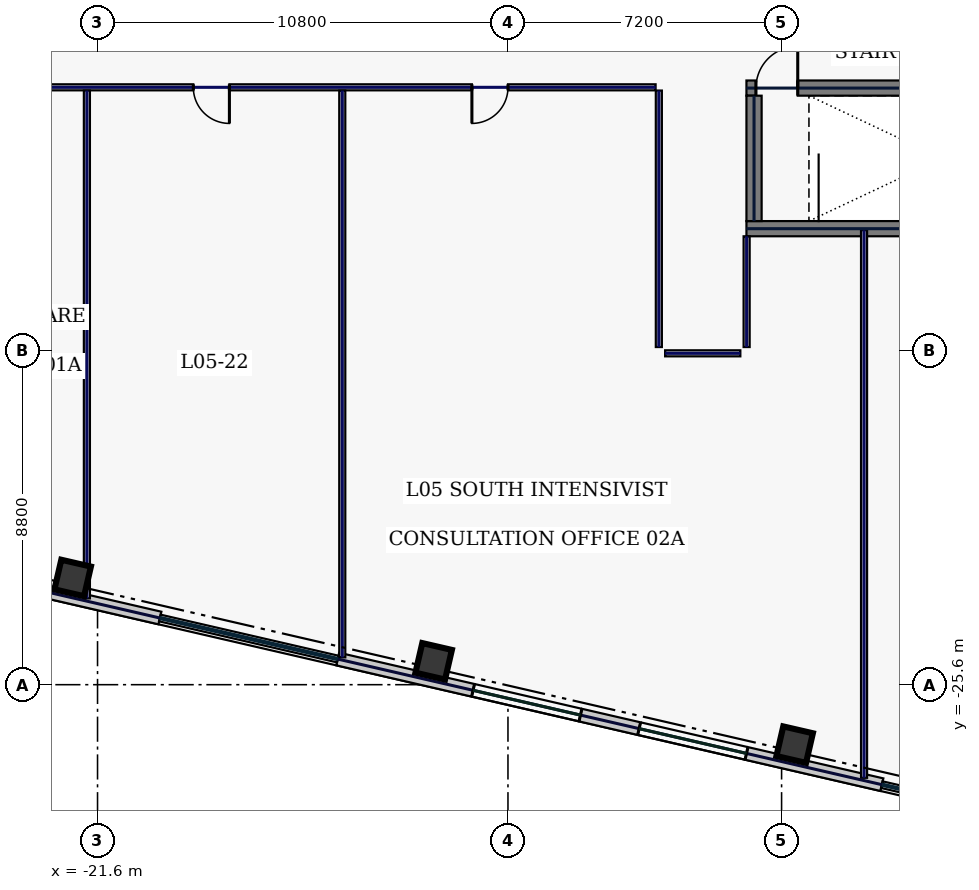
"""IFC4 building model, lengths in metres.
Left out: names, types, materials, properties, quantities, classifications, styles, units other than length and angle.
Written with IfcOpenShell. Run it as: python <this file> out.ifc"""

import sys

from ifc_helpers import new_model, si_unit, direction, frame, frame_2d, origin, origin_2d, place, context, subcontext, project, spatial, rectangle, hollow_rectangle, extrude, element, fill, save


model = new_model("IFC4")
c1 = context("Model", 3, precision=1e-05, world=origin(), true_north=direction((0.0, 1.0)))
c2 = subcontext(c1, "Body", "Model", "MODEL_VIEW")
j1 = project(units=[si_unit("LENGTHUNIT", "METRE"), si_unit("PLANEANGLEUNIT", "RADIAN")], contexts=[c1])
p1 = place(None, origin())
s1 = spatial("IfcSite", under=j1, at=p1, CompositionType="ELEMENT")
p2 = place(p1, origin())
s2 = spatial("IfcBuilding", under=s1, at=p2, CompositionType="ELEMENT")
p3 = place(p2, frame((0.0, 0.0, 28.4)))
s3 = spatial("IfcBuildingStorey", under=s2, at=p3, CompositionType="ELEMENT", Elevation=28.4)
p4 = place(p3, frame((-4.525, -13.6, 0.0), z_axis=(0.0, 0.0, 1.0), x_axis=(1.0, 0.0, 0.0)))
e1 = element("IfcWall", 1, at=p4, inside=s3, PredefinedType="SHEAR", context=c2, shape_type="SweptSolid", body=[
    extrude(rectangle(XDim=9.05, YDim=0.4, at=frame_2d((4.525, 0.0))), origin(), (0.0, 0.0, 1.0), 4.68),
])
p5 = place(p3, frame((-4.525, -9.9, 0.0), z_axis=(0.0, 0.0, 1.0), x_axis=(1.0, 0.0, 0.0)))
e2 = element("IfcWall", 2, at=p5, inside=s3, PredefinedType="SHEAR", context=c2, shape_type="SweptSolid", body=[
    extrude(rectangle(XDim=9.05, YDim=0.4, at=frame_2d((4.525, 0.0))), origin(), (0.0, 0.0, 1.0), 4.68),
])
p6 = place(p5, frame((0.25, 0.0, 0.0)))
e3 = element("IfcOpeningElement", 3, at=p6, cuts=e2, PredefinedType="OPENING", context=c2, shape_type="SweptSolid", body=[
    extrude(rectangle(XDim=1.1, YDim=2.2, at=frame_2d((0.55, 1.1))), frame((0.0, 0.21, 0.0), z_axis=(0.0, -1.0, 0.0), x_axis=(1.0, 0.0, 0.0)), (0.0, 0.0, 1.0), 0.42),
])
p7 = place(p3, frame((-4.325, -13.4, 0.0), z_axis=(0.0, 0.0, 1.0), x_axis=(0.0, 1.0, 0.0)))
e4 = element("IfcWall", 4, at=p7, inside=s3, PredefinedType="SHEAR", context=c2, shape_type="SweptSolid", body=[
    extrude(rectangle(XDim=3.3, YDim=0.4, at=frame_2d((1.65, 0.0))), origin(), (0.0, 0.0, 1.0), 4.68),
])
for number, where, z_axis, x_axis in (
    (5, (-22.254, -22.792, 0.0), (0.0, 0.0, 1.0), (0.974, -0.225, 0.0)),
    (6, (-12.755, -24.985, 0.0), (0.0, 0.0, 1.0), (0.974, -0.225, 0.0)),
    (7, (-3.256, -27.178, 0.0), (0.0, 0.0, 1.0), (0.974, -0.225, 0.0)),
):
    element("IfcColumn", number, at=place(p3, frame(where, z_axis=z_axis, x_axis=x_axis)), inside=s3, PredefinedType="COLUMN", context=c2, shape_type="SweptSolid", body=[
        extrude(hollow_rectangle(XDim=0.8, YDim=0.8, WallThickness=0.036, at=origin_2d()), origin(), (0.0, 0.0, 1.0), 4.68),
    ])
p8 = place(p3, frame((-42.029, -18.75, 0.0), z_axis=(0.0, 0.0, 1.0), x_axis=(0.97436993772, -0.224951604723, 0.0)))
e8 = element("IfcWall", 8, at=p8, inside=s3, PredefinedType="STANDARD", context=c2, shape_type="SweptSolid", body=[
    extrude(rectangle(XDim=22.651, YDim=0.34, at=frame_2d((11.326, 0.0))), origin(), (0.0, 0.0, 1.0), 4.68),
])
p9 = place(p8, frame((1.862, 0.0, 0.85)))
e9 = element("IfcOpeningElement", 9, at=p9, cuts=e8, PredefinedType="OPENING", context=c2, shape_type="SweptSolid", body=[
    extrude(rectangle(XDim=2.9, YDim=2.3, at=frame_2d((1.45, 1.15))), frame((0.0, 0.18, 0.0), z_axis=(0.0, -1.0, 0.0), x_axis=(1.0, 0.0, 0.0)), (0.0, 0.0, 1.0), 0.36),
])
p10 = place(p8, frame((6.346, 0.0, 0.85)))
e10 = element("IfcOpeningElement", 10, at=p10, cuts=e8, PredefinedType="OPENING", context=c2, shape_type="SweptSolid", body=[
    extrude(rectangle(XDim=2.9, YDim=2.3, at=frame_2d((1.45, 1.15))), frame((0.0, 0.18, 0.0), z_axis=(0.0, -1.0, 0.0), x_axis=(1.0, 0.0, 0.0)), (0.0, 0.0, 1.0), 0.36),
])
p11 = place(p8, frame((13.661, 0.0, 0.85)))
e11 = element("IfcOpeningElement", 11, at=p11, cuts=e8, PredefinedType="OPENING", context=c2, shape_type="SweptSolid", body=[
    extrude(rectangle(XDim=0.85, YDim=1.85, at=frame_2d((0.425, 0.925))), frame((0.0, 0.18, 0.0), z_axis=(0.0, -1.0, 0.0), x_axis=(1.0, 0.0, 0.0)), (0.0, 0.0, 1.0), 0.36),
])
p12 = place(p8, frame((16.095, 0.0, 0.85)))
e12 = element("IfcOpeningElement", 12, at=p12, cuts=e8, PredefinedType="OPENING", context=c2, shape_type="SweptSolid", body=[
    extrude(rectangle(XDim=2.9, YDim=2.3, at=frame_2d((1.45, 1.15))), frame((0.0, 0.18, 0.0), z_axis=(0.0, -1.0, 0.0), x_axis=(1.0, 0.0, 0.0)), (0.0, 0.0, 1.0), 0.36),
])
p13 = place(p3, frame((-15.281, -24.925, 0.0), z_axis=(0.0, 0.0, 1.0), x_axis=(0.974370193991, -0.22495049469, 0.0)))
e13 = element("IfcWall", 13, at=p13, inside=s3, PredefinedType="STANDARD", context=c2, shape_type="SweptSolid", body=[
    extrude(rectangle(XDim=14.697, YDim=0.34, at=frame_2d((7.349, 0.0))), origin(), (0.0, 0.0, 1.0), 4.68),
])
p14 = place(p13, frame((3.656, 0.0, 0.85)))
e14 = element("IfcOpeningElement", 14, at=p14, cuts=e13, PredefinedType="OPENING", context=c2, shape_type="SweptSolid", body=[
    extrude(rectangle(XDim=2.9, YDim=2.3, at=frame_2d((1.45, 1.15))), frame((0.0, 0.18, 0.0), z_axis=(0.0, -1.0, 0.0), x_axis=(1.0, 0.0, 0.0)), (0.0, 0.0, 1.0), 0.36),
])
p15 = place(p13, frame((8.141, 0.0, 0.85)))
e15 = element("IfcOpeningElement", 15, at=p15, cuts=e13, PredefinedType="OPENING", context=c2, shape_type="SweptSolid", body=[
    extrude(rectangle(XDim=2.9, YDim=2.3, at=frame_2d((1.45, 1.15))), frame((0.0, 0.18, 0.0), z_axis=(0.0, -1.0, 0.0), x_axis=(1.0, 0.0, 0.0)), (0.0, 0.0, 1.0), 0.36),
])
p16 = place(p3, frame((-4.52, -13.8, 0.0), z_axis=(0.0, 0.0, 1.0), x_axis=(0.0, -1.0, 0.0)))
e16 = element("IfcWall", 16, at=p16, inside=s3, PredefinedType="PARTITIONING", context=c2, shape_type="SweptSolid", body=[
    extrude(rectangle(XDim=2.915, YDim=0.16, at=frame_2d((1.458, 0.0))), origin(), (0.0, 0.0, 1.0), 4.68),
])
p17 = place(p3, frame((-4.685, -16.88, 0.0), z_axis=(0.0, 0.0, 1.0), x_axis=(-1.0, 0.0, 0.0)))
e17 = element("IfcWall", 17, at=p17, inside=s3, PredefinedType="PARTITIONING", context=c2, shape_type="SweptSolid", body=[
    extrude(rectangle(XDim=1.98, YDim=0.16, at=frame_2d((0.99, 0.0))), origin(), (0.0, 0.0, 1.0), 4.68),
])
p18 = place(p3, frame((-6.83, -16.715, 0.0), z_axis=(0.0, 0.0, 1.0), x_axis=(0.0, 1.0, 0.0)))
e18 = element("IfcWall", 18, at=p18, inside=s3, PredefinedType="PARTITIONING", context=c2, shape_type="SweptSolid", body=[
    extrude(rectangle(XDim=6.75, YDim=0.16, at=frame_2d((3.375, 0.0))), origin(), (0.0, 0.0, 1.0), 4.68),
])
p19 = place(p3, frame((-6.915, -9.88, 0.0), z_axis=(0.0, 0.0, 1.0), x_axis=(-1.0, 0.0, 0.0)))
e19 = element("IfcWall", 19, at=p19, inside=s3, PredefinedType="PARTITIONING", context=c2, shape_type="SweptSolid", body=[
    extrude(rectangle(XDim=22.5, YDim=0.16, at=frame_2d((11.25, 0.0))), origin(), (0.0, 0.0, 1.0), 4.68),
])
p20 = place(p19, frame((18.191, 0.0, 0.0)))
e20 = element("IfcOpeningElement", 20, at=p20, cuts=e19, PredefinedType="OPENING", context=c2, shape_type="SweptSolid", body=[
    extrude(rectangle(XDim=1.05, YDim=2.2, at=frame_2d((0.525, 1.1))), frame((0.0, 0.09, 0.0), z_axis=(0.0, -1.0, 0.0), x_axis=(1.0, 0.0, 0.0)), (0.0, 0.0, 1.0), 0.18),
])
p21 = place(p19, frame((11.215, 0.0, 0.0)))
e21 = element("IfcOpeningElement", 21, at=p21, cuts=e19, PredefinedType="OPENING", context=c2, shape_type="SweptSolid", body=[
    extrude(rectangle(XDim=0.95, YDim=2.2, at=frame_2d((0.475, 1.1))), frame((0.0, 0.09, 0.0), z_axis=(0.0, -1.0, 0.0), x_axis=(1.0, 0.0, 0.0)), (0.0, 0.0, 1.0), 0.18),
])
p22 = place(p19, frame((3.884, 0.0, 0.0)))
e22 = element("IfcOpeningElement", 22, at=p22, cuts=e19, PredefinedType="OPENING", context=c2, shape_type="SweptSolid", body=[
    extrude(rectangle(XDim=0.95, YDim=2.2, at=frame_2d((0.475, 1.1))), frame((0.0, 0.09, 0.0), z_axis=(0.0, -1.0, 0.0), x_axis=(1.0, 0.0, 0.0)), (0.0, 0.0, 1.0), 0.18),
])
p23 = place(p3, frame((-15.16, -24.881, 0.0), z_axis=(0.0, 0.0, 1.0), x_axis=(0.0, 1.0, 0.0)))
e23 = element("IfcWall", 23, at=p23, inside=s3, PredefinedType="PARTITIONING", context=c2, shape_type="SweptSolid", body=[
    extrude(rectangle(XDim=14.916, YDim=0.16, at=frame_2d((7.458, 0.0))), origin(), (0.0, 0.0, 1.0), 4.68),
])
p24 = place(p3, frame((-21.88, -23.33, 0.0), z_axis=(0.0, 0.0, 1.0), x_axis=(0.0, 1.0, 0.0)))
e24 = element("IfcWall", 24, at=p24, inside=s3, PredefinedType="PARTITIONING", context=c2, shape_type="SweptSolid", body=[
    extrude(rectangle(XDim=13.365, YDim=0.16, at=frame_2d((6.682, 0.0))), origin(), (0.0, 0.0, 1.0), 4.68),
])
p25 = place(p3, frame((-1.43, -28.051, 0.0), z_axis=(0.0, 0.0, 1.0), x_axis=(0.0, 1.0, 0.0)))
e25 = element("IfcWall", 25, at=p25, inside=s3, PredefinedType="PARTITIONING", context=c2, shape_type="SweptSolid", body=[
    extrude(rectangle(XDim=14.411, YDim=0.16, at=frame_2d((7.206, 0.0))), origin(), (0.0, 0.0, 1.0), 4.68),
])
p26 = place(p14, origin())
e26 = element("IfcWindow", 26, at=p26, inside=s3, PartitioningType="SINGLE_PANEL", PredefinedType="WINDOW", context=c2, shape_type="SweptSolid", body=[
    extrude(rectangle(XDim=2.9, YDim=2.3, at=frame_2d((1.45, 1.15))), frame((0.0, 0.03, 0.0), z_axis=(0.0, -1.0, 0.0), x_axis=(1.0, 0.0, 0.0)), (0.0, 0.0, 1.0), 0.06),
])
fill(e14, e26)
p27 = place(p15, origin())
e27 = element("IfcWindow", 27, at=p27, inside=s3, PartitioningType="SINGLE_PANEL", PredefinedType="WINDOW", context=c2, shape_type="SweptSolid", body=[
    extrude(rectangle(XDim=2.9, YDim=2.3, at=frame_2d((1.45, 1.15))), frame((0.0, 0.03, 0.0), z_axis=(0.0, -1.0, 0.0), x_axis=(1.0, 0.0, 0.0)), (0.0, 0.0, 1.0), 0.06),
])
fill(e15, e27)
p28 = place(p6, origin())
e28 = element("IfcDoor", 28, at=p28, inside=s3, OperationType="SINGLE_SWING_RIGHT", PredefinedType="DOOR", context=c2, shape_type="SweptSolid", body=[
    extrude(rectangle(XDim=1.1, YDim=2.2, at=frame_2d((0.55, 1.1))), frame((0.0, 0.025, 0.0), z_axis=(0.0, -1.0, 0.0), x_axis=(1.0, 0.0, 0.0)), (0.0, 0.0, 1.0), 0.05),
])
fill(e3, e28)
p29 = place(p21, origin())
e29 = element("IfcDoor", 29, at=p29, inside=s3, OperationType="SINGLE_SWING_LEFT", PredefinedType="DOOR", context=c2, shape_type="SweptSolid", body=[
    extrude(rectangle(XDim=0.95, YDim=2.2, at=frame_2d((0.475, 1.1))), frame((0.0, 0.025, 0.0), z_axis=(0.0, -1.0, 0.0), x_axis=(1.0, 0.0, 0.0)), (0.0, 0.0, 1.0), 0.05),
])
fill(e21, e29)
p30 = place(p22, origin())
e30 = element("IfcDoor", 30, at=p30, inside=s3, OperationType="SINGLE_SWING_RIGHT", PredefinedType="DOOR", context=c2, shape_type="SweptSolid", body=[
    extrude(rectangle(XDim=0.95, YDim=2.2, at=frame_2d((0.475, 1.1))), frame((0.0, 0.025, 0.0), z_axis=(0.0, -1.0, 0.0), x_axis=(1.0, 0.0, 0.0)), (0.0, 0.0, 1.0), 0.05),
])
fill(e22, e30)
save(model, sys.argv[1])
